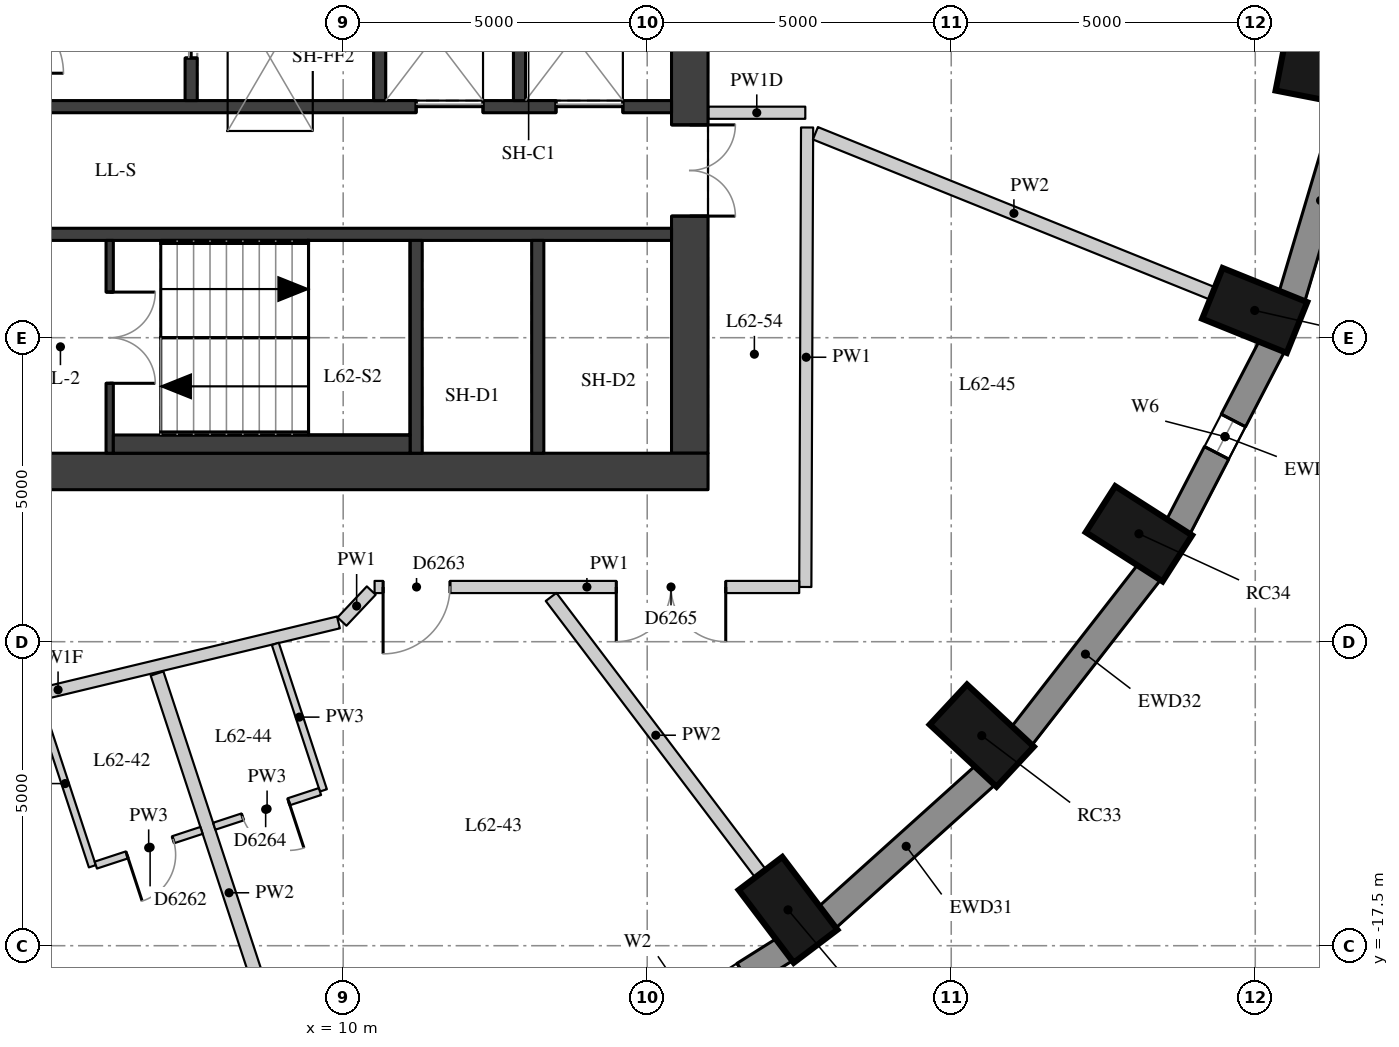
"""IFC4 building model, lengths in metres.
Left out: names, types, materials, properties, quantities, classifications, styles, units other than length and angle.
Written with IfcOpenShell. Run it as: python <this file> out.ifc"""

import sys

from ifc_helpers import new_model, si_unit, direction, frame, frame_2d, origin, origin_2d, place, context, subcontext, project, spatial, rectangle, extrude, element, fill, save


model = new_model("IFC4")
c1 = context("Model", 3, precision=1e-05, world=origin(), true_north=direction((0.0, 1.0)))
c2 = subcontext(c1, "Body", "Model", "MODEL_VIEW")
j1 = project(units=[si_unit("LENGTHUNIT", "METRE"), si_unit("PLANEANGLEUNIT", "RADIAN")], contexts=[c1])
p1 = place(None, origin())
s1 = spatial("IfcSite", under=j1, at=p1, CompositionType="ELEMENT")
p2 = place(p1, origin())
s2 = spatial("IfcBuilding", under=s1, at=p2, CompositionType="ELEMENT")
p3 = place(p2, frame((0.0, 0.0, 218.9)))
s3 = spatial("IfcBuildingStorey", under=s2, at=p3, CompositionType="ELEMENT", Elevation=218.9)
for number, where, z_axis, x_axis in (
    (1, (17.316, -16.911, 0.0), (0.0, 0.0, 1.0), (0.604, -0.797, 0.0)),
    (2, (20.502, -14.045, 0.0), (0.0, 0.0, 1.0), (0.732, -0.681, 0.0)),
    (3, (23.087, -10.725, 0.0), (0.0, 0.0, 1.0), (0.842, -0.539, 0.0)),
    (4, (24.991, -7.052, 0.0), (0.0, 0.0, 1.0), (0.927, -0.374, 0.0)),
    (5, (26.157, -3.137, 0.0), (0.0, 0.0, 1.0), (0.981, -0.192, 0.0)),
):
    element("IfcColumn", number, at=place(p3, frame(where, z_axis=z_axis, x_axis=x_axis)), inside=s3, PredefinedType="COLUMN", context=c2, shape_type="SweptSolid", body=[
        extrude(rectangle(XDim=1.5, YDim=0.9, at=origin_2d()), origin(), (0.0, 0.0, 1.0), 3.3),
    ])
p4 = place(p3, frame((14.232, -19.47, 0.0), z_axis=(0.0, 0.0, 1.0), x_axis=(0.84614984472, 0.532945063098, 0.0)))
e6 = element("IfcWall", 6, at=p4, inside=s3, PredefinedType="SOLIDWALL", context=c2, shape_type="SweptSolid", body=[
    extrude(rectangle(XDim=3.586, YDim=0.45, at=frame_2d((1.793, 0.0))), origin(), (0.0, 0.0, 1.0), 3.02),
])
p5 = place(p4, frame((0.793, 0.0, 0.4)))
e7 = element("IfcOpeningElement", 7, at=p5, cuts=e6, PredefinedType="OPENING", context=c2, shape_type="SweptSolid", body=[
    extrude(rectangle(XDim=2.0, YDim=1.75, at=frame_2d((1.0, 0.875))), frame((0.0, 0.235, 0.0), z_axis=(0.0, -1.0, 0.0), x_axis=(1.0, 0.0, 0.0)), (0.0, 0.0, 1.0), 0.47),
])
p6 = place(p3, frame((17.953, -17.04, 0.0), z_axis=(0.0, 0.0, 1.0), x_axis=(0.743442727602, 0.668799604348, 0.0)))
e8 = element("IfcWall", 8, at=p6, inside=s3, PredefinedType="SOLIDWALL", context=c2, shape_type="SweptSolid", body=[
    extrude(rectangle(XDim=3.513, YDim=0.45, at=frame_2d((1.756, 0.0))), origin(), (0.0, 0.0, 1.0), 3.02),
])
p7 = place(p3, frame((21.151, -14.061, 0.0), z_axis=(0.0, 0.0, 1.0), x_axis=(0.614255239631, 0.789107407509, 0.0)))
e9 = element("IfcWall", 9, at=p7, inside=s3, PredefinedType="SOLIDWALL", context=c2, shape_type="SweptSolid", body=[
    extrude(rectangle(XDim=3.438, YDim=0.45, at=frame_2d((1.719, 0.0))), origin(), (0.0, 0.0, 1.0), 3.02),
])
p8 = place(p3, frame((23.727, -10.624, 0.0), z_axis=(0.0, 0.0, 1.0), x_axis=(0.460175500475, 0.887827972505, 0.0)))
e10 = element("IfcWall", 10, at=p8, inside=s3, PredefinedType="SOLIDWALL", context=c2, shape_type="SweptSolid", body=[
    extrude(rectangle(XDim=3.371, YDim=0.45, at=frame_2d((1.685, 0.0))), origin(), (0.0, 0.0, 1.0), 3.02),
])
p9 = place(p8, frame((1.385, 0.0, 0.4)))
e11 = element("IfcOpeningElement", 11, at=p9, cuts=e10, PredefinedType="OPENING", context=c2, shape_type="SweptSolid", body=[
    extrude(rectangle(XDim=0.6, YDim=1.75, at=frame_2d((0.3, 0.875))), frame((0.0, 0.235, 0.0), z_axis=(0.0, -1.0, 0.0), x_axis=(1.0, 0.0, 0.0)), (0.0, 0.0, 1.0), 0.47),
])
p10 = place(p3, frame((25.6, -6.834, 0.0), z_axis=(0.0, 0.0, 1.0), x_axis=(0.285444972963, 0.958395099847, 0.0)))
e12 = element("IfcWall", 12, at=p10, inside=s3, PredefinedType="SOLIDWALL", context=c2, shape_type="SweptSolid", body=[
    extrude(rectangle(XDim=3.32, YDim=0.45, at=frame_2d((1.66, 0.0))), origin(), (0.0, 0.0, 1.0), 3.02),
])
p11 = place(p3, frame((15.7, -9.4, 0.0), z_axis=(0.0, 0.0, 1.0), x_axis=(0.0, 1.0, 0.0)))
e13 = element("IfcWall", 13, at=p11, inside=s3, PredefinedType="SHEAR", context=c2, shape_type="SweptSolid", body=[
    extrude(rectangle(XDim=18.8, YDim=0.6, at=frame_2d((9.4, 0.0))), origin(), (0.0, 0.0, 1.0), 3.02),
])
p12 = place(p11, frame((13.4, 0.0, 0.0)))
e14 = element("IfcOpeningElement", 14, at=p12, cuts=e13, PredefinedType="OPENING", context=c2, shape_type="SweptSolid", body=[
    extrude(rectangle(XDim=1.5, YDim=2.1, at=frame_2d((0.75, 1.05))), frame((0.0, 0.31, 0.0), z_axis=(0.0, -1.0, 0.0), x_axis=(1.0, 0.0, 0.0)), (0.0, 0.0, 1.0), 0.62),
])
p13 = place(p11, frame((3.9, 0.0, 0.0)))
e15 = element("IfcOpeningElement", 15, at=p13, cuts=e13, PredefinedType="OPENING", context=c2, shape_type="SweptSolid", body=[
    extrude(rectangle(XDim=1.5, YDim=2.1, at=frame_2d((0.75, 1.05))), frame((0.0, 0.31, 0.0), z_axis=(0.0, -1.0, 0.0), x_axis=(1.0, 0.0, 0.0)), (0.0, 0.0, 1.0), 0.62),
])
p14 = place(p3, frame((4.0, -9.7, 0.0), z_axis=(0.0, 0.0, 1.0), x_axis=(1.0, 0.0, 0.0)))
e16 = element("IfcWall", 16, at=p14, inside=s3, PredefinedType="SHEAR", context=c2, shape_type="SweptSolid", body=[
    extrude(rectangle(XDim=12.0, YDim=0.6, at=frame_2d((6.0, 0.0))), origin(), (0.0, 0.0, 1.0), 3.02),
])
p15 = place(p3, frame((4.6, -3.7, 0.0), z_axis=(0.0, 0.0, 1.0), x_axis=(1.0, 0.0, 0.0)))
e17 = element("IfcWall", 17, at=p15, inside=s3, PredefinedType="SHEAR", context=c2, shape_type="SweptSolid", body=[
    extrude(rectangle(XDim=10.8, YDim=0.2, at=frame_2d((5.4, 0.0))), origin(), (0.0, 0.0, 1.0), 3.02),
])
p16 = place(p15, frame((6.6, 0.0, 0.0)))
e18 = element("IfcOpeningElement", 18, at=p16, cuts=e17, PredefinedType="OPENING", context=c2, shape_type="SweptSolid", body=[
    extrude(rectangle(XDim=1.1, YDim=2.1, at=frame_2d((0.55, 1.05))), frame((0.0, 0.11, 0.0), z_axis=(0.0, -1.0, 0.0), x_axis=(1.0, 0.0, 0.0)), (0.0, 0.0, 1.0), 0.22),
])
p17 = place(p15, frame((8.9, 0.0, 0.0)))
e19 = element("IfcOpeningElement", 19, at=p17, cuts=e17, PredefinedType="OPENING", context=c2, shape_type="SweptSolid", body=[
    extrude(rectangle(XDim=1.1, YDim=2.1, at=frame_2d((0.55, 1.05))), frame((0.0, 0.11, 0.0), z_axis=(0.0, -1.0, 0.0), x_axis=(1.0, 0.0, 0.0)), (0.0, 0.0, 1.0), 0.22),
])
p18 = place(p3, frame((4.6, -5.8, 0.0), z_axis=(0.0, 0.0, 1.0), x_axis=(1.0, 0.0, 0.0)))
e20 = element("IfcWall", 20, at=p18, inside=s3, PredefinedType="SHEAR", context=c2, shape_type="SweptSolid", body=[
    extrude(rectangle(XDim=10.8, YDim=0.2, at=frame_2d((5.4, 0.0))), origin(), (0.0, 0.0, 1.0), 3.02),
])
for number, where, z_axis, x_axis in (
    (21, (11.2, -9.4, 0.0), (0.0, 0.0, 1.0), (0.0, 1.0, 0.0)),
    (22, (13.2, -9.4, 0.0), (0.0, 0.0, 1.0), (0.0, 1.0, 0.0)),
):
    element("IfcWall", number, at=place(p3, frame(where, z_axis=z_axis, x_axis=x_axis)), inside=s3, PredefinedType="SHEAR", context=c2, shape_type="SweptSolid", body=[
        extrude(rectangle(XDim=3.5, YDim=0.2, at=frame_2d((1.75, 0.0))), origin(), (0.0, 0.0, 1.0), 3.02),
    ])
p19 = place(p3, frame((7.5, -3.6, 0.0), z_axis=(0.0, 0.0, 1.0), x_axis=(0.0, 1.0, 0.0)))
e23 = element("IfcWall", 23, at=p19, inside=s3, PredefinedType="SHEAR", context=c2, shape_type="SweptSolid", body=[
    extrude(rectangle(XDim=2.5, YDim=0.2, at=frame_2d((1.25, 0.0))), origin(), (0.0, 0.0, 1.0), 3.02),
])
p20 = place(p19, frame((0.7, 0.0, 0.0)))
e24 = element("IfcOpeningElement", 24, at=p20, cuts=e23, PredefinedType="OPENING", context=c2, shape_type="SweptSolid", body=[
    extrude(rectangle(XDim=1.1, YDim=2.1, at=frame_2d((0.55, 1.05))), frame((0.0, 0.11, 0.0), z_axis=(0.0, -1.0, 0.0), x_axis=(1.0, 0.0, 0.0)), (0.0, 0.0, 1.0), 0.22),
])
for number, where, z_axis, x_axis in (
    (25, (10.6, -3.6, 0.0), (0.0, 0.0, 1.0), (0.0, 1.0, 0.0)),
    (26, (12.9, -3.6, 0.0), (0.0, 0.0, 1.0), (0.0, 1.0, 0.0)),
):
    element("IfcWall", number, at=place(p3, frame(where, z_axis=z_axis, x_axis=x_axis)), inside=s3, PredefinedType="SHEAR", context=c2, shape_type="SweptSolid", body=[
        extrude(rectangle(XDim=2.5, YDim=0.2, at=frame_2d((1.25, 0.0))), origin(), (0.0, 0.0, 1.0), 3.02),
    ])
p21 = place(p3, frame((6.16, -9.4, 0.0), z_axis=(0.0, 0.0, 1.0), x_axis=(0.0, 1.0, 0.0)))
e27 = element("IfcWall", 27, at=p21, inside=s3, PredefinedType="SHEAR", context=c2, shape_type="SweptSolid", body=[
    extrude(rectangle(XDim=3.5, YDim=0.12, at=frame_2d((1.75, 0.0))), origin(), (0.0, 0.0, 1.0), 3.02),
])
p22 = place(p21, frame((1.15, 0.0, 0.0)))
e28 = element("IfcOpeningElement", 28, at=p22, cuts=e27, PredefinedType="OPENING", context=c2, shape_type="SweptSolid", body=[
    extrude(rectangle(XDim=1.5, YDim=2.1, at=frame_2d((0.75, 1.05))), frame((0.0, 0.07, 0.0), z_axis=(0.0, -1.0, 0.0), x_axis=(1.0, 0.0, 0.0)), (0.0, 0.0, 1.0), 0.14),
])
p23 = place(p3, frame((6.22, -9.25, 0.0), z_axis=(0.0, 0.0, 1.0), x_axis=(1.0, 0.0, 0.0)))
e29 = element("IfcWall", 29, at=p23, inside=s3, PredefinedType="PARTITIONING", context=c2, shape_type="SweptSolid", body=[
    extrude(rectangle(XDim=4.88, YDim=0.3, at=frame_2d((2.44, 0.0))), origin(), (0.0, 0.0, 1.0), 3.02),
])
p24 = place(p3, frame((17.63, -4.043, 0.0), z_axis=(0.0, 0.0, 1.0), x_axis=(-0.003908870153, -0.999992360338, 0.0)))
e30 = element("IfcWall", 30, at=p24, inside=s3, PredefinedType="PARTITIONING", context=c2, shape_type="SweptSolid", body=[
    extrude(rectangle(XDim=7.557, YDim=0.2, at=frame_2d((3.779, 0.0))), origin(), (0.0, 0.0, 1.0), 3.02),
])
p25 = place(p3, frame((17.5, -11.6, 0.0), z_axis=(0.0, 0.0, 1.0), x_axis=(-1.0, 0.0, 0.0)))
e31 = element("IfcWall", 31, at=p25, inside=s3, PredefinedType="PARTITIONING", context=c2, shape_type="SweptSolid", body=[
    extrude(rectangle(XDim=6.983, YDim=0.2, at=frame_2d((3.492, 0.0))), origin(), (0.0, 0.0, 1.0), 3.02),
])
p26 = place(p25, frame((5.743, 0.0, 0.0)))
e32 = element("IfcOpeningElement", 32, at=p26, cuts=e31, PredefinedType="OPENING", context=c2, shape_type="SweptSolid", body=[
    extrude(rectangle(XDim=1.1, YDim=2.1, at=frame_2d((0.55, 1.05))), frame((0.0, 0.11, 0.0), z_axis=(0.0, -1.0, 0.0), x_axis=(1.0, 0.0, 0.0)), (0.0, 0.0, 1.0), 0.22),
])
p27 = place(p25, frame((1.208, 0.0, 0.0)))
e33 = element("IfcOpeningElement", 33, at=p27, cuts=e31, PredefinedType="OPENING", context=c2, shape_type="SweptSolid", body=[
    extrude(rectangle(XDim=1.8, YDim=2.1, at=frame_2d((0.9, 1.05))), frame((0.0, 0.11, 0.0), z_axis=(0.0, -1.0, 0.0), x_axis=(1.0, 0.0, 0.0)), (0.0, 0.0, 1.0), 0.22),
])
p28 = place(p3, frame((10.462, -11.659, 0.0), z_axis=(0.0, 0.0, 1.0), x_axis=(-0.686265612426, -0.727351021998, 0.0)))
e34 = element("IfcWall", 34, at=p28, inside=s3, PredefinedType="PARTITIONING", context=c2, shape_type="SweptSolid", body=[
    extrude(rectangle(XDim=0.701, YDim=0.2, at=frame_2d((0.351, 0.0))), origin(), (0.0, 0.0, 1.0), 3.02),
])
p29 = place(p3, frame((9.922, -12.183, 0.0), z_axis=(0.0, 0.0, 1.0), x_axis=(-0.972292362394, -0.233768180104, 0.0)))
e35 = element("IfcWall", 35, at=p29, inside=s3, PredefinedType="PARTITIONING", context=c2, shape_type="SweptSolid", body=[
    extrude(rectangle(XDim=9.485, YDim=0.2, at=frame_2d((4.742, 0.0))), origin(), (0.0, 0.0, 1.0), 2.42),
])
p30 = place(p29, frame((8.245, 0.0, 0.0)))
e36 = element("IfcOpeningElement", 36, at=p30, cuts=e35, PredefinedType="OPENING", context=c2, shape_type="SweptSolid", body=[
    extrude(rectangle(XDim=1.1, YDim=2.1, at=frame_2d((0.55, 1.05))), frame((0.0, 0.11, 0.0), z_axis=(0.0, -1.0, 0.0), x_axis=(1.0, 0.0, 0.0)), (0.0, 0.0, 1.0), 0.22),
])
p31 = place(p3, frame((16.004, -3.8, 0.0), z_axis=(0.0, 0.0, 1.0), x_axis=(1.0, 0.0, 0.0)))
e37 = element("IfcWall", 37, at=p31, inside=s3, PredefinedType="PARTITIONING", context=c2, shape_type="SweptSolid", body=[
    extrude(rectangle(XDim=1.596, YDim=0.2, at=frame_2d((0.798, 0.0))), origin(), (0.0, 0.0, 1.0), 2.47),
])
p32 = place(p3, frame((9.307, -20.235, 0.0), z_axis=(0.0, 0.0, 1.0), x_axis=(-0.311979110549, 0.950088961404, 0.0)))
e38 = element("IfcWall", 38, at=p32, inside=s3, PredefinedType="PARTITIONING", context=c2, shape_type="SweptSolid", body=[
    extrude(rectangle(XDim=7.591, YDim=0.22, at=frame_2d((3.795, 0.0))), origin(), (0.0, 0.0, 1.0), 3.02),
])
p33 = place(p3, frame((16.863, -16.312, 0.0), z_axis=(0.0, 0.0, 1.0), x_axis=(-0.603636051313, 0.797260006243, 0.0)))
e39 = element("IfcWall", 39, at=p33, inside=s3, PredefinedType="PARTITIONING", context=c2, shape_type="SweptSolid", body=[
    extrude(rectangle(XDim=5.706, YDim=0.22, at=frame_2d((2.853, 0.0))), origin(), (0.0, 0.0, 1.0), 3.02),
])
p34 = place(p3, frame((24.295, -6.771, 0.0), z_axis=(0.0, 0.0, 1.0), x_axis=(-0.927386950843, 0.374103519639, 0.0)))
e40 = element("IfcWall", 40, at=p34, inside=s3, PredefinedType="PARTITIONING", context=c2, shape_type="SweptSolid", body=[
    extrude(rectangle(XDim=7.04, YDim=0.22, at=frame_2d((3.52, 0.0))), origin(), (0.0, 0.0, 1.0), 3.02),
])
p35 = place(p3, frame((4.981, -13.473, 0.0), z_axis=(0.0, 0.0, 1.0), x_axis=(0.312029038347, -0.950072565243, 0.0)))
e41 = element("IfcWall", 41, at=p35, inside=s3, PredefinedType="PARTITIONING", context=c2, shape_type="SweptSolid", body=[
    extrude(rectangle(XDim=2.863, YDim=0.12, at=frame_2d((1.431, 0.0))), origin(), (0.0, 0.0, 1.0), 3.02),
])
p36 = place(p3, frame((8.884, -12.535, 0.0), z_axis=(0.0, 0.0, 1.0), x_axis=(0.312037873477, -0.950069663507, 0.0)))
e42 = element("IfcWall", 42, at=p36, inside=s3, PredefinedType="PARTITIONING", context=c2, shape_type="SweptSolid", body=[
    extrude(rectangle(XDim=2.537, YDim=0.12, at=frame_2d((1.268, 0.0))), origin(), (0.0, 0.0, 1.0), 3.02),
])
p37 = place(p3, frame((5.932, -16.174, 0.0), z_axis=(0.0, 0.0, 1.0), x_axis=(0.950140787885, 0.311821235962, 0.0)))
e43 = element("IfcWall", 43, at=p37, inside=s3, PredefinedType="PARTITIONING", context=c2, shape_type="SweptSolid", body=[
    extrude(rectangle(XDim=1.83, YDim=0.12, at=frame_2d((0.915, 0.0))), origin(), (0.0, 0.0, 1.0), 3.02),
])
p38 = place(p37, frame((0.54, 0.0, 0.0)))
e44 = element("IfcOpeningElement", 44, at=p38, cuts=e43, PredefinedType="OPENING", context=c2, shape_type="SweptSolid", body=[
    extrude(rectangle(XDim=0.8, YDim=2.1, at=frame_2d((0.4, 1.05))), frame((0.0, 0.07, 0.0), z_axis=(0.0, -1.0, 0.0), x_axis=(1.0, 0.0, 0.0)), (0.0, 0.0, 1.0), 0.14),
])
p39 = place(p3, frame((9.618, -14.964, 0.0), z_axis=(0.0, 0.0, 1.0), x_axis=(-0.950140787885, -0.311821235962, 0.0)))
e45 = element("IfcWall", 45, at=p39, inside=s3, PredefinedType="PARTITIONING", context=c2, shape_type="SweptSolid", body=[
    extrude(rectangle(XDim=1.83, YDim=0.12, at=frame_2d((0.915, 0.0))), origin(), (0.0, 0.0, 1.0), 3.02),
])
p40 = place(p39, frame((0.54, 0.0, 0.0)))
e46 = element("IfcOpeningElement", 46, at=p40, cuts=e45, PredefinedType="OPENING", context=c2, shape_type="SweptSolid", body=[
    extrude(rectangle(XDim=0.8, YDim=2.1, at=frame_2d((0.4, 1.05))), frame((0.0, 0.07, 0.0), z_axis=(0.0, -1.0, 0.0), x_axis=(1.0, 0.0, 0.0)), (0.0, 0.0, 1.0), 0.14),
])
p41 = place(p9, origin())
e47 = element("IfcWindow", 47, at=p41, inside=s3, PartitioningType="SINGLE_PANEL", PredefinedType="WINDOW", context=c2, shape_type="SweptSolid", body=[
    extrude(rectangle(XDim=0.6, YDim=1.75, at=frame_2d((0.3, 0.875))), frame((0.0, 0.035, 0.0), z_axis=(0.0, -1.0, 0.0), x_axis=(1.0, 0.0, 0.0)), (0.0, 0.0, 1.0), 0.06),
])
fill(e11, e47)
p42 = place(p13, origin())
e48 = element("IfcDoor", 48, at=p42, inside=s3, OperationType="DOUBLE_DOOR_SINGLE_SWING", PredefinedType="DOOR", context=c2, shape_type="SweptSolid", body=[
    extrude(rectangle(XDim=1.5, YDim=2.1, at=frame_2d((0.75, 1.05))), frame((0.0, 0.025, 0.0), z_axis=(0.0, -1.0, 0.0), x_axis=(1.0, 0.0, 0.0)), (0.0, 0.0, 1.0), 0.05),
])
fill(e15, e48)
p43 = place(p22, origin())
e49 = element("IfcDoor", 49, at=p43, inside=s3, OperationType="DOUBLE_DOOR_SINGLE_SWING", PredefinedType="DOOR", context=c2, shape_type="SweptSolid", body=[
    extrude(rectangle(XDim=1.5, YDim=2.1, at=frame_2d((0.75, 1.05))), frame((0.0, 0.025, 0.0), z_axis=(0.0, -1.0, 0.0), x_axis=(1.0, 0.0, 0.0)), (0.0, 0.0, 1.0), 0.05),
])
fill(e28, e49)
p44 = place(p16, origin())
e50 = element("IfcDoor", 50, at=p44, inside=s3, OperationType="DOUBLE_DOOR_SLIDING", PredefinedType="DOOR", context=c2, shape_type="SweptSolid", body=[
    extrude(rectangle(XDim=1.1, YDim=2.1, at=frame_2d((0.55, 1.05))), frame((0.0, 0.025, 0.0), z_axis=(0.0, -1.0, 0.0), x_axis=(1.0, 0.0, 0.0)), (0.0, 0.0, 1.0), 0.05),
])
fill(e18, e50)
p45 = place(p17, origin())
e51 = element("IfcDoor", 51, at=p45, inside=s3, OperationType="DOUBLE_DOOR_SLIDING", PredefinedType="DOOR", context=c2, shape_type="SweptSolid", body=[
    extrude(rectangle(XDim=1.1, YDim=2.1, at=frame_2d((0.55, 1.05))), frame((0.0, 0.025, 0.0), z_axis=(0.0, -1.0, 0.0), x_axis=(1.0, 0.0, 0.0)), (0.0, 0.0, 1.0), 0.05),
])
fill(e19, e51)
p46 = place(p20, origin())
e52 = element("IfcDoor", 52, at=p46, inside=s3, OperationType="DOUBLE_DOOR_SLIDING", PredefinedType="DOOR", context=c2, shape_type="SweptSolid", body=[
    extrude(rectangle(XDim=1.1, YDim=2.1, at=frame_2d((0.55, 1.05))), frame((0.0, 0.025, 0.0), z_axis=(0.0, -1.0, 0.0), x_axis=(1.0, 0.0, 0.0)), (0.0, 0.0, 1.0), 0.05),
])
fill(e24, e52)
p47 = place(p38, origin())
e53 = element("IfcDoor", 53, at=p47, inside=s3, OperationType="SINGLE_SWING_RIGHT", PredefinedType="DOOR", context=c2, shape_type="SweptSolid", body=[
    extrude(rectangle(XDim=0.8, YDim=2.1, at=frame_2d((0.4, 1.05))), frame((0.0, 0.025, 0.0), z_axis=(0.0, -1.0, 0.0), x_axis=(1.0, 0.0, 0.0)), (0.0, 0.0, 1.0), 0.05),
])
fill(e44, e53)
p48 = place(p26, origin())
e54 = element("IfcDoor", 54, at=p48, inside=s3, OperationType="SINGLE_SWING_RIGHT", PredefinedType="DOOR", context=c2, shape_type="SweptSolid", body=[
    extrude(rectangle(XDim=1.1, YDim=2.1, at=frame_2d((0.55, 1.05))), frame((0.0, 0.025, 0.0), z_axis=(0.0, -1.0, 0.0), x_axis=(1.0, 0.0, 0.0)), (0.0, 0.0, 1.0), 0.05),
])
fill(e32, e54)
p49 = place(p40, origin())
e55 = element("IfcDoor", 55, at=p49, inside=s3, OperationType="SINGLE_SWING_LEFT", PredefinedType="DOOR", context=c2, shape_type="SweptSolid", body=[
    extrude(rectangle(XDim=0.8, YDim=2.1, at=frame_2d((0.4, 1.05))), frame((0.0, 0.025, 0.0), z_axis=(0.0, -1.0, 0.0), x_axis=(1.0, 0.0, 0.0)), (0.0, 0.0, 1.0), 0.05),
])
fill(e46, e55)
p50 = place(p27, origin())
e56 = element("IfcDoor", 56, at=p50, inside=s3, OperationType="DOUBLE_DOOR_SINGLE_SWING", PredefinedType="DOOR", context=c2, shape_type="SweptSolid", body=[
    extrude(rectangle(XDim=1.8, YDim=2.1, at=frame_2d((0.9, 1.05))), frame((0.0, 0.025, 0.0), z_axis=(0.0, -1.0, 0.0), x_axis=(1.0, 0.0, 0.0)), (0.0, 0.0, 1.0), 0.05),
])
fill(e33, e56)
save(model, sys.argv[1])
